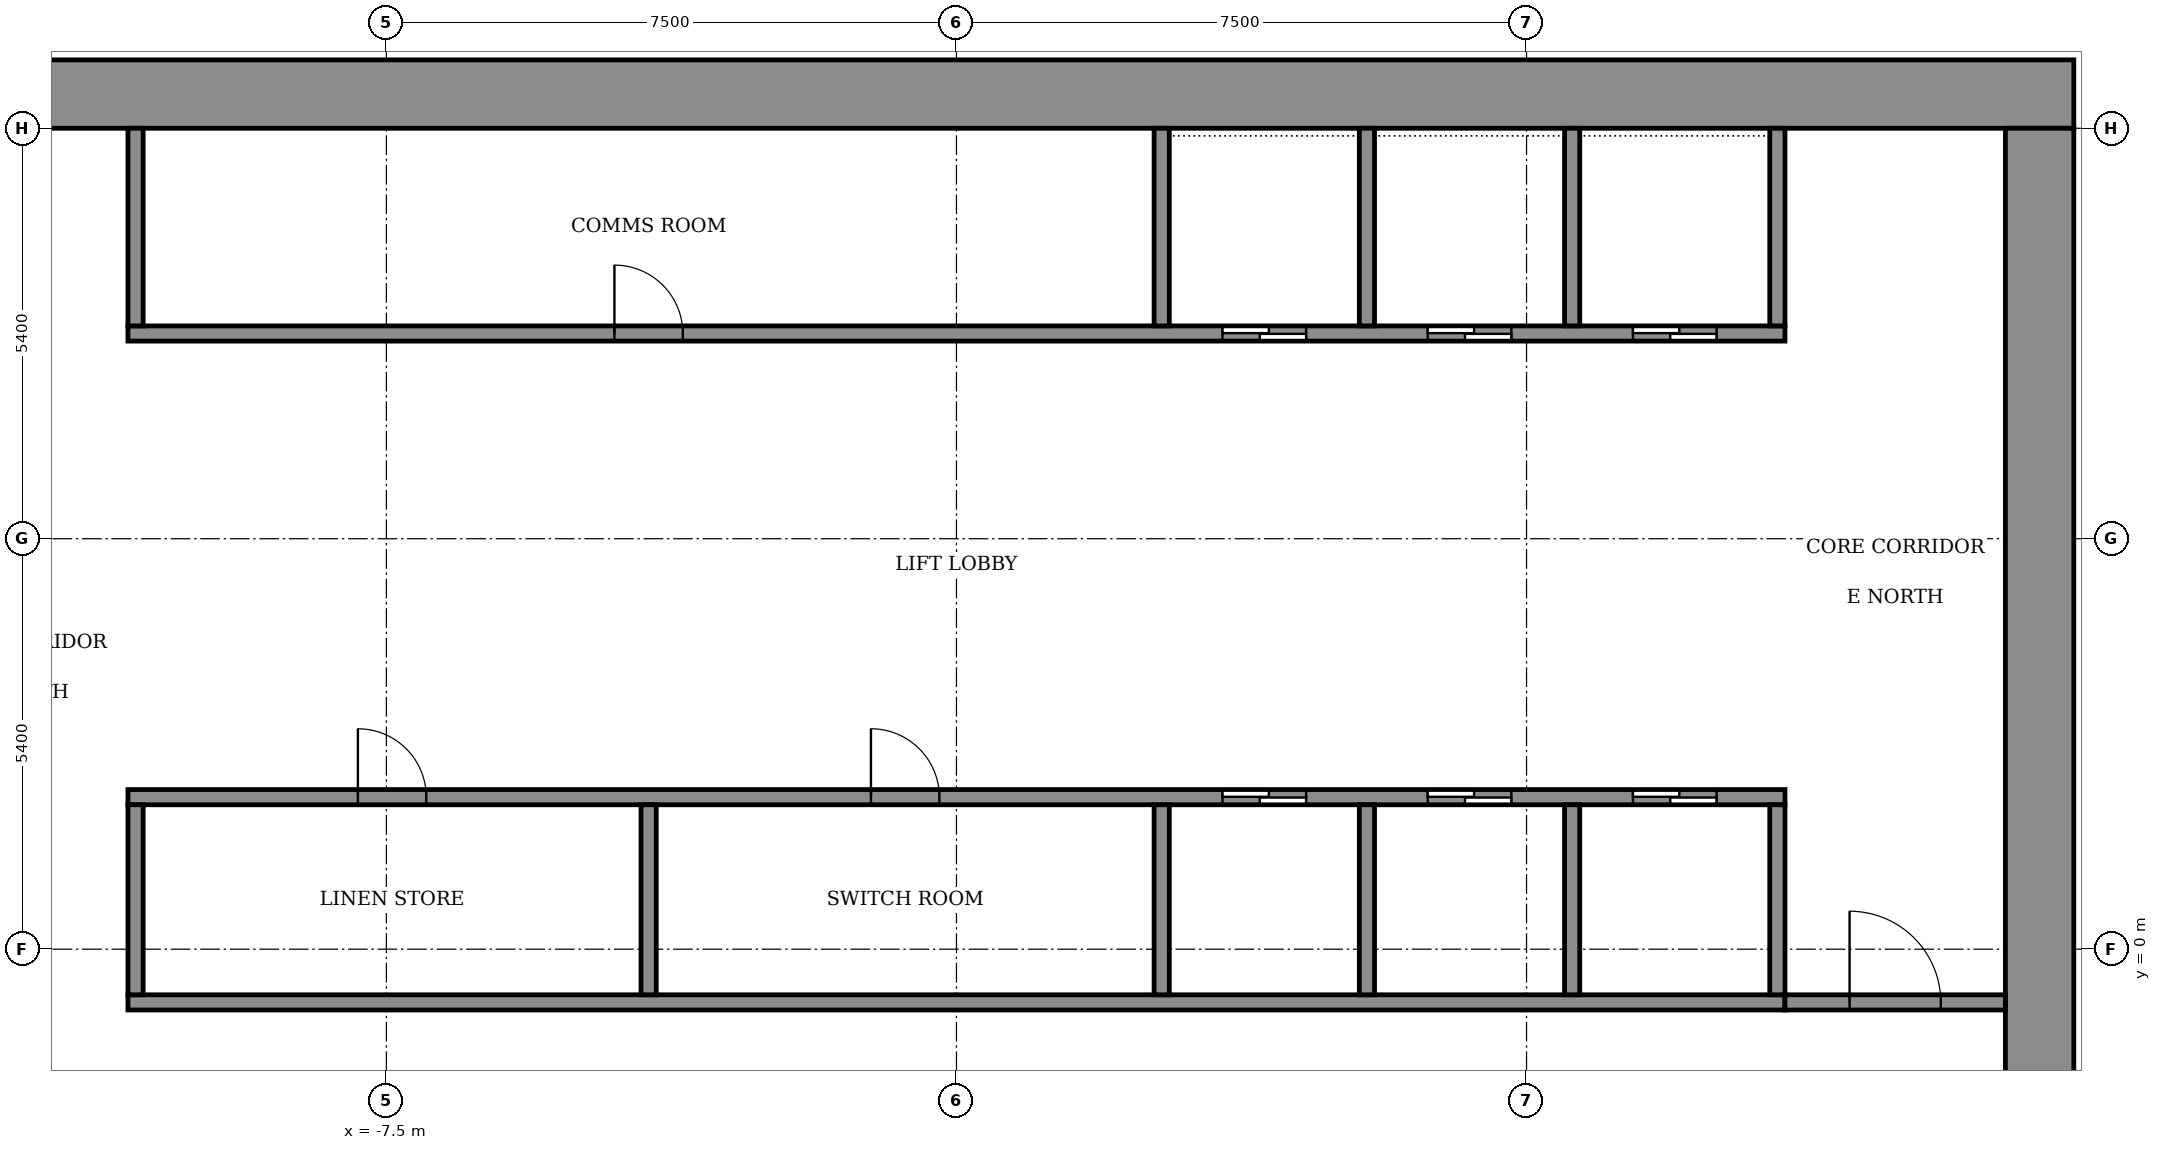
"""IFC4 building model, lengths in metres.
Left out: names, types, materials, properties, quantities, classifications, styles, units other than length and angle.
Written with IfcOpenShell. Run it as: python <this file> out.ifc"""

import sys

from ifc_helpers import new_model, si_unit, direction, frame, frame_2d, origin, place, context, subcontext, project, spatial, rectangle, extrude, element, fill, save


model = new_model("IFC4")
c1 = context("Model", 3, precision=1e-05, world=origin(), true_north=direction((0.0, 1.0)))
c2 = subcontext(c1, "Body", "Model", "MODEL_VIEW")
j1 = project(units=[si_unit("LENGTHUNIT", "METRE"), si_unit("PLANEANGLEUNIT", "RADIAN")], contexts=[c1])
p1 = place(None, origin())
s1 = spatial("IfcSite", under=j1, at=p1, CompositionType="ELEMENT")
p2 = place(p1, origin())
s2 = spatial("IfcBuilding", under=s1, at=p2, CompositionType="ELEMENT")
p3 = place(p2, frame((0.0, 0.0, 189.7)))
s3 = spatial("IfcBuildingStorey", under=s2, at=p3, CompositionType="ELEMENT", Elevation=189.7)
p4 = place(p3, frame((-14.7, 11.25, 0.0), z_axis=(0.0, 0.0, 1.0), x_axis=(1.0, 0.0, 0.0)))
e1 = element("IfcWall", 1, at=p4, inside=s3, PredefinedType="SHEAR", context=c2, shape_type="SweptSolid", body=[
    extrude(rectangle(XDim=29.4, YDim=0.9, at=frame_2d((14.7, 0.0))), origin(), (0.0, 0.0, 1.0), 3.6),
])
p5 = place(p3, frame((14.25, -10.8, 0.0), z_axis=(0.0, 0.0, 1.0), x_axis=(0.0, 1.0, 0.0)))
e2 = element("IfcWall", 2, at=p5, inside=s3, PredefinedType="SHEAR", context=c2, shape_type="SweptSolid", body=[
    extrude(rectangle(XDim=21.6, YDim=0.9, at=frame_2d((10.8, 0.0))), origin(), (0.0, 0.0, 1.0), 3.6),
])
p6 = place(p5, frame((1.2, 0.0, 0.0)))
e3 = element("IfcOpeningElement", 3, at=p6, cuts=e2, PredefinedType="OPENING", context=c2, shape_type="SweptSolid", body=[
    extrude(rectangle(XDim=1.2, YDim=2.1, at=frame_2d((0.6, 1.05))), frame((0.0, 0.46, 0.0), z_axis=(0.0, -1.0, 0.0), x_axis=(1.0, 0.0, 0.0)), (0.0, 0.0, 1.0), 0.92),
])
p7 = place(p3, frame((-10.9, -0.7, 0.0), z_axis=(0.0, 0.0, 1.0), x_axis=(1.0, 0.0, 0.0)))
e4 = element("IfcWall", 4, at=p7, inside=s3, PredefinedType="SHEAR", context=c2, shape_type="SweptSolid", body=[
    extrude(rectangle(XDim=21.8, YDim=0.2, at=frame_2d((10.9, 0.0))), origin(), (0.0, 0.0, 1.0), 3.05),
])
p8 = place(p3, frame((-10.9, 2.0, 0.0), z_axis=(0.0, 0.0, 1.0), x_axis=(1.0, 0.0, 0.0)))
e5 = element("IfcWall", 5, at=p8, inside=s3, PredefinedType="SHEAR", context=c2, shape_type="SweptSolid", body=[
    extrude(rectangle(XDim=21.8, YDim=0.2, at=frame_2d((10.9, 0.0))), origin(), (0.0, 0.0, 1.0), 3.05),
])
p9 = place(p8, frame((14.4, 0.0, 0.0)))
e6 = element("IfcOpeningElement", 6, at=p9, cuts=e5, PredefinedType="OPENING", context=c2, shape_type="SweptSolid", body=[
    extrude(rectangle(XDim=1.1, YDim=2.1, at=frame_2d((0.55, 1.05))), frame((0.0, 0.11, 0.0), z_axis=(0.0, -1.0, 0.0), x_axis=(1.0, 0.0, 0.0)), (0.0, 0.0, 1.0), 0.22),
])
p10 = place(p8, frame((17.1, 0.0, 0.0)))
e7 = element("IfcOpeningElement", 7, at=p10, cuts=e5, PredefinedType="OPENING", context=c2, shape_type="SweptSolid", body=[
    extrude(rectangle(XDim=1.1, YDim=2.1, at=frame_2d((0.55, 1.05))), frame((0.0, 0.11, 0.0), z_axis=(0.0, -1.0, 0.0), x_axis=(1.0, 0.0, 0.0)), (0.0, 0.0, 1.0), 0.22),
])
p11 = place(p8, frame((19.8, 0.0, 0.0)))
e8 = element("IfcOpeningElement", 8, at=p11, cuts=e5, PredefinedType="OPENING", context=c2, shape_type="SweptSolid", body=[
    extrude(rectangle(XDim=1.1, YDim=2.1, at=frame_2d((0.55, 1.05))), frame((0.0, 0.11, 0.0), z_axis=(0.0, -1.0, 0.0), x_axis=(1.0, 0.0, 0.0)), (0.0, 0.0, 1.0), 0.22),
])
p12 = place(p8, frame((3.025, 0.0, 0.0)))
e9 = element("IfcOpeningElement", 9, at=p12, cuts=e5, PredefinedType="OPENING", context=c2, shape_type="SweptSolid", body=[
    extrude(rectangle(XDim=0.9, YDim=2.1, at=frame_2d((0.45, 1.05))), frame((0.0, 0.11, 0.0), z_axis=(0.0, -1.0, 0.0), x_axis=(1.0, 0.0, 0.0)), (0.0, 0.0, 1.0), 0.22),
])
p13 = place(p8, frame((9.775, 0.0, 0.0)))
e10 = element("IfcOpeningElement", 10, at=p13, cuts=e5, PredefinedType="OPENING", context=c2, shape_type="SweptSolid", body=[
    extrude(rectangle(XDim=0.9, YDim=2.1, at=frame_2d((0.45, 1.05))), frame((0.0, 0.11, 0.0), z_axis=(0.0, -1.0, 0.0), x_axis=(1.0, 0.0, 0.0)), (0.0, 0.0, 1.0), 0.22),
])
p14 = place(p3, frame((-10.9, 8.1, 0.0), z_axis=(0.0, 0.0, 1.0), x_axis=(1.0, 0.0, 0.0)))
e11 = element("IfcWall", 11, at=p14, inside=s3, PredefinedType="SHEAR", context=c2, shape_type="SweptSolid", body=[
    extrude(rectangle(XDim=21.8, YDim=0.2, at=frame_2d((10.9, 0.0))), origin(), (0.0, 0.0, 1.0), 3.05),
])
p15 = place(p14, frame((14.4, 0.0, 0.0)))
e12 = element("IfcOpeningElement", 12, at=p15, cuts=e11, PredefinedType="OPENING", context=c2, shape_type="SweptSolid", body=[
    extrude(rectangle(XDim=1.1, YDim=2.1, at=frame_2d((0.55, 1.05))), frame((0.0, 0.11, 0.0), z_axis=(0.0, -1.0, 0.0), x_axis=(1.0, 0.0, 0.0)), (0.0, 0.0, 1.0), 0.22),
])
p16 = place(p14, frame((17.1, 0.0, 0.0)))
e13 = element("IfcOpeningElement", 13, at=p16, cuts=e11, PredefinedType="OPENING", context=c2, shape_type="SweptSolid", body=[
    extrude(rectangle(XDim=1.1, YDim=2.1, at=frame_2d((0.55, 1.05))), frame((0.0, 0.11, 0.0), z_axis=(0.0, -1.0, 0.0), x_axis=(1.0, 0.0, 0.0)), (0.0, 0.0, 1.0), 0.22),
])
p17 = place(p14, frame((19.8, 0.0, 0.0)))
e14 = element("IfcOpeningElement", 14, at=p17, cuts=e11, PredefinedType="OPENING", context=c2, shape_type="SweptSolid", body=[
    extrude(rectangle(XDim=1.1, YDim=2.1, at=frame_2d((0.55, 1.05))), frame((0.0, 0.11, 0.0), z_axis=(0.0, -1.0, 0.0), x_axis=(1.0, 0.0, 0.0)), (0.0, 0.0, 1.0), 0.22),
])
p18 = place(p14, frame((6.4, 0.0, 0.0)))
e15 = element("IfcOpeningElement", 15, at=p18, cuts=e11, PredefinedType="OPENING", context=c2, shape_type="SweptSolid", body=[
    extrude(rectangle(XDim=0.9, YDim=2.1, at=frame_2d((0.45, 1.05))), frame((0.0, 0.11, 0.0), z_axis=(0.0, -1.0, 0.0), x_axis=(1.0, 0.0, 0.0)), (0.0, 0.0, 1.0), 0.22),
])
for number, where, z_axis, x_axis in (
    (16, (-10.8, -0.6, 0.0), (0.0, 0.0, 1.0), (0.0, 1.0, 0.0)),
    (17, (-4.05, -0.6, 0.0), (0.0, 0.0, 1.0), (0.0, 1.0, 0.0)),
):
    element("IfcWall", number, at=place(p3, frame(where, z_axis=z_axis, x_axis=x_axis)), inside=s3, PredefinedType="STANDARD", context=c2, shape_type="SweptSolid", body=[
        extrude(rectangle(XDim=2.5, YDim=0.2, at=frame_2d((1.25, 0.0))), origin(), (0.0, 0.0, 1.0), 3.05),
    ])
for number, where, z_axis, x_axis in (
    (18, (2.7, -0.6, 0.0), (0.0, 0.0, 1.0), (0.0, 1.0, 0.0)),
    (19, (5.4, -0.6, 0.0), (0.0, 0.0, 1.0), (0.0, 1.0, 0.0)),
    (20, (8.1, -0.6, 0.0), (0.0, 0.0, 1.0), (0.0, 1.0, 0.0)),
    (21, (10.8, -0.6, 0.0), (0.0, 0.0, 1.0), (0.0, 1.0, 0.0)),
):
    element("IfcWall", number, at=place(p3, frame(where, z_axis=z_axis, x_axis=x_axis)), inside=s3, PredefinedType="SHEAR", context=c2, shape_type="SweptSolid", body=[
        extrude(rectangle(XDim=2.5, YDim=0.2, at=frame_2d((1.25, 0.0))), origin(), (0.0, 0.0, 1.0), 3.05),
    ])
p19 = place(p3, frame((-10.8, 8.2, 0.0), z_axis=(0.0, 0.0, 1.0), x_axis=(0.0, 1.0, 0.0)))
e22 = element("IfcWall", 22, at=p19, inside=s3, PredefinedType="STANDARD", context=c2, shape_type="SweptSolid", body=[
    extrude(rectangle(XDim=2.6, YDim=0.2, at=frame_2d((1.3, 0.0))), origin(), (0.0, 0.0, 1.0), 3.05),
])
for number, where, z_axis, x_axis in (
    (23, (2.7, 8.2, 0.0), (0.0, 0.0, 1.0), (0.0, 1.0, 0.0)),
    (24, (5.4, 8.2, 0.0), (0.0, 0.0, 1.0), (0.0, 1.0, 0.0)),
    (25, (8.1, 8.2, 0.0), (0.0, 0.0, 1.0), (0.0, 1.0, 0.0)),
    (26, (10.8, 8.2, 0.0), (0.0, 0.0, 1.0), (0.0, 1.0, 0.0)),
):
    element("IfcWall", number, at=place(p3, frame(where, z_axis=z_axis, x_axis=x_axis)), inside=s3, PredefinedType="SHEAR", context=c2, shape_type="SweptSolid", body=[
        extrude(rectangle(XDim=2.6, YDim=0.2, at=frame_2d((1.3, 0.0))), origin(), (0.0, 0.0, 1.0), 3.05),
    ])
p20 = place(p3, frame((10.9, -0.7, 0.0), z_axis=(0.0, 0.0, 1.0), x_axis=(1.0, 0.0, 0.0)))
e27 = element("IfcWall", 27, at=p20, inside=s3, PredefinedType="STANDARD", context=c2, shape_type="SweptSolid", body=[
    extrude(rectangle(XDim=2.9, YDim=0.2, at=frame_2d((1.45, 0.0))), origin(), (0.0, 0.0, 1.0), 3.05),
])
p21 = place(p20, frame((0.85, 0.0, 0.0)))
e28 = element("IfcOpeningElement", 28, at=p21, cuts=e27, PredefinedType="OPENING", context=c2, shape_type="SweptSolid", body=[
    extrude(rectangle(XDim=1.2, YDim=2.1, at=frame_2d((0.6, 1.05))), frame((0.0, 0.11, 0.0), z_axis=(0.0, -1.0, 0.0), x_axis=(1.0, 0.0, 0.0)), (0.0, 0.0, 1.0), 0.22),
])
p22 = place(p9, origin())
e29 = element("IfcDoor", 29, at=p22, inside=s3, OperationType="SLIDING_TO_LEFT", PredefinedType="DOOR", context=c2, shape_type="SweptSolid", body=[
    extrude(rectangle(XDim=1.1, YDim=2.1, at=frame_2d((0.55, 1.05))), frame((0.0, 0.025, 0.0), z_axis=(0.0, -1.0, 0.0), x_axis=(1.0, 0.0, 0.0)), (0.0, 0.0, 1.0), 0.05),
])
fill(e6, e29)
p23 = place(p10, origin())
e30 = element("IfcDoor", 30, at=p23, inside=s3, OperationType="SLIDING_TO_LEFT", PredefinedType="DOOR", context=c2, shape_type="SweptSolid", body=[
    extrude(rectangle(XDim=1.1, YDim=2.1, at=frame_2d((0.55, 1.05))), frame((0.0, 0.025, 0.0), z_axis=(0.0, -1.0, 0.0), x_axis=(1.0, 0.0, 0.0)), (0.0, 0.0, 1.0), 0.05),
])
fill(e7, e30)
p24 = place(p11, origin())
e31 = element("IfcDoor", 31, at=p24, inside=s3, OperationType="SLIDING_TO_LEFT", PredefinedType="DOOR", context=c2, shape_type="SweptSolid", body=[
    extrude(rectangle(XDim=1.1, YDim=2.1, at=frame_2d((0.55, 1.05))), frame((0.0, 0.025, 0.0), z_axis=(0.0, -1.0, 0.0), x_axis=(1.0, 0.0, 0.0)), (0.0, 0.0, 1.0), 0.05),
])
fill(e8, e31)
p25 = place(p15, origin())
e32 = element("IfcDoor", 32, at=p25, inside=s3, OperationType="SLIDING_TO_LEFT", PredefinedType="DOOR", context=c2, shape_type="SweptSolid", body=[
    extrude(rectangle(XDim=1.1, YDim=2.1, at=frame_2d((0.55, 1.05))), frame((0.0, 0.025, 0.0), z_axis=(0.0, -1.0, 0.0), x_axis=(1.0, 0.0, 0.0)), (0.0, 0.0, 1.0), 0.05),
])
fill(e12, e32)
p26 = place(p16, origin())
e33 = element("IfcDoor", 33, at=p26, inside=s3, OperationType="SLIDING_TO_LEFT", PredefinedType="DOOR", context=c2, shape_type="SweptSolid", body=[
    extrude(rectangle(XDim=1.1, YDim=2.1, at=frame_2d((0.55, 1.05))), frame((0.0, 0.025, 0.0), z_axis=(0.0, -1.0, 0.0), x_axis=(1.0, 0.0, 0.0)), (0.0, 0.0, 1.0), 0.05),
])
fill(e13, e33)
p27 = place(p17, origin())
e34 = element("IfcDoor", 34, at=p27, inside=s3, OperationType="SLIDING_TO_LEFT", PredefinedType="DOOR", context=c2, shape_type="SweptSolid", body=[
    extrude(rectangle(XDim=1.1, YDim=2.1, at=frame_2d((0.55, 1.05))), frame((0.0, 0.025, 0.0), z_axis=(0.0, -1.0, 0.0), x_axis=(1.0, 0.0, 0.0)), (0.0, 0.0, 1.0), 0.05),
])
fill(e14, e34)
p28 = place(p12, origin())
e35 = element("IfcDoor", 35, at=p28, inside=s3, OperationType="SINGLE_SWING_RIGHT", PredefinedType="DOOR", context=c2, shape_type="SweptSolid", body=[
    extrude(rectangle(XDim=0.9, YDim=2.1, at=frame_2d((0.45, 1.05))), frame((0.0, 0.025, 0.0), z_axis=(0.0, -1.0, 0.0), x_axis=(1.0, 0.0, 0.0)), (0.0, 0.0, 1.0), 0.05),
])
fill(e9, e35)
p29 = place(p13, origin())
e36 = element("IfcDoor", 36, at=p29, inside=s3, OperationType="SINGLE_SWING_LEFT", PredefinedType="DOOR", context=c2, shape_type="SweptSolid", body=[
    extrude(rectangle(XDim=0.9, YDim=2.1, at=frame_2d((0.45, 1.05))), frame((0.0, 0.025, 0.0), z_axis=(0.0, -1.0, 0.0), x_axis=(1.0, 0.0, 0.0)), (0.0, 0.0, 1.0), 0.05),
])
fill(e10, e36)
p30 = place(p18, origin())
e37 = element("IfcDoor", 37, at=p30, inside=s3, OperationType="SINGLE_SWING_LEFT", PredefinedType="DOOR", context=c2, shape_type="SweptSolid", body=[
    extrude(rectangle(XDim=0.9, YDim=2.1, at=frame_2d((0.45, 1.05))), frame((0.0, 0.025, 0.0), z_axis=(0.0, -1.0, 0.0), x_axis=(1.0, 0.0, 0.0)), (0.0, 0.0, 1.0), 0.05),
])
fill(e15, e37)
p31 = place(p21, origin())
e38 = element("IfcDoor", 38, at=p31, inside=s3, OperationType="SINGLE_SWING_LEFT", PredefinedType="DOOR", context=c2, shape_type="SweptSolid", body=[
    extrude(rectangle(XDim=1.2, YDim=2.1, at=frame_2d((0.6, 1.05))), frame((0.0, 0.025, 0.0), z_axis=(0.0, -1.0, 0.0), x_axis=(1.0, 0.0, 0.0)), (0.0, 0.0, 1.0), 0.05),
])
fill(e28, e38)
save(model, sys.argv[1])
